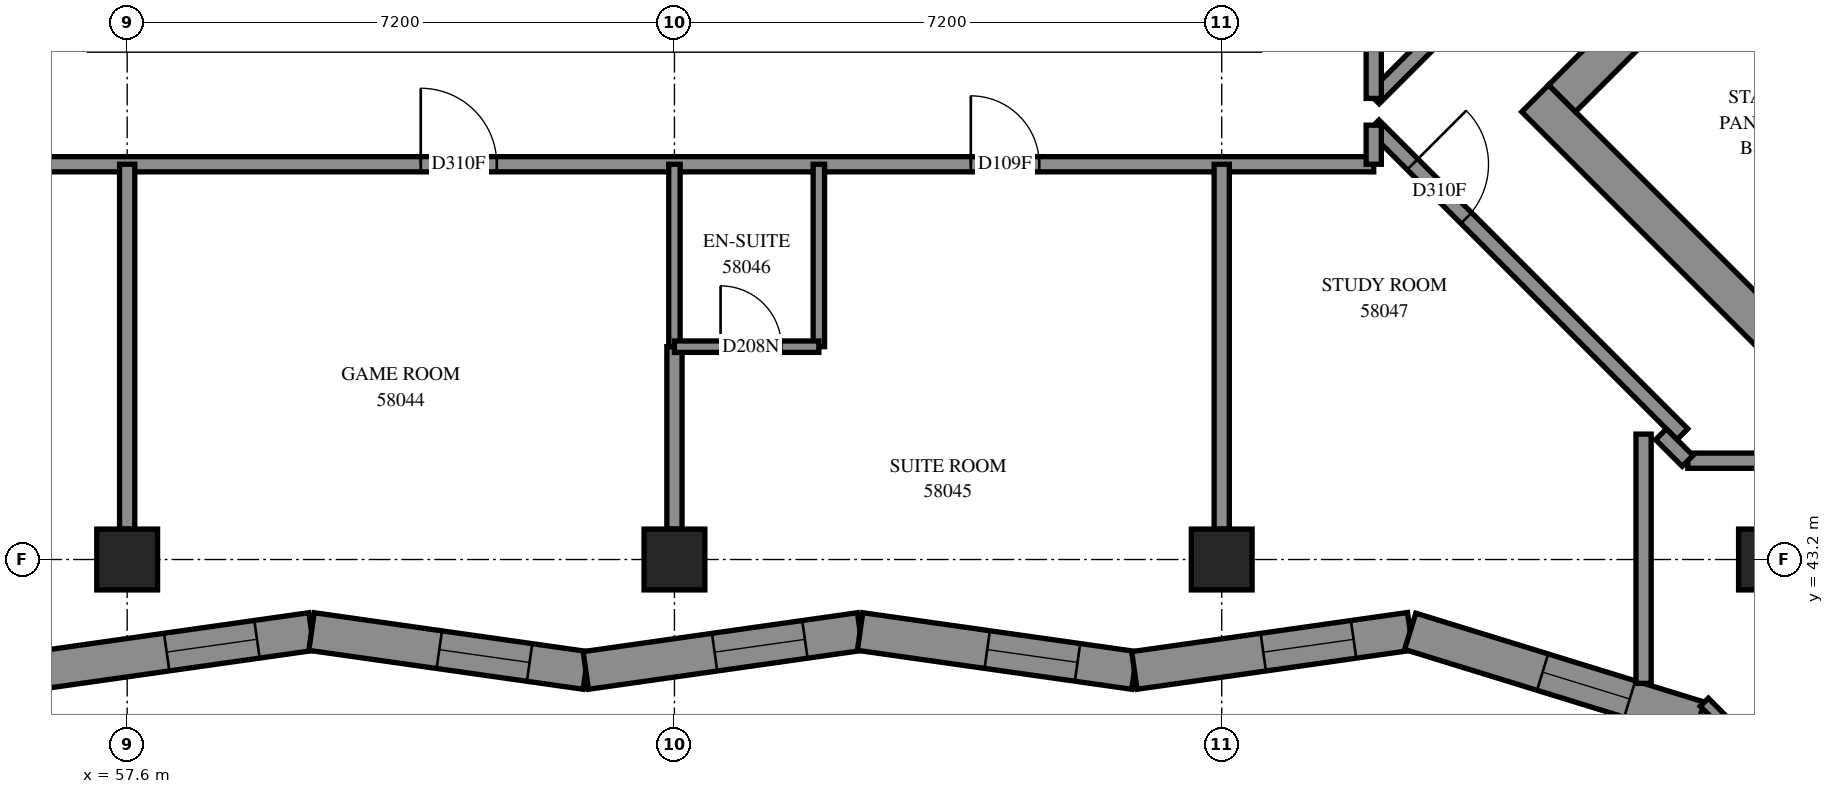
"""IFC4 building model, lengths in metres.
Left out: names, types, materials, properties, quantities, classifications, styles, units other than length and angle.
Written with IfcOpenShell. Run it as: python <this file> out.ifc"""

import sys

from ifc_helpers import new_model, si_unit, direction, frame, frame_2d, origin, origin_2d, place, context, subcontext, project, spatial, polyline, rectangle, outline, extrude, element, fill, save


model = new_model("IFC4")
c1 = context("Model", 3, precision=1e-05, world=origin(), true_north=direction((0.0, 1.0)))
c2 = subcontext(c1, "Body", "Model", "MODEL_VIEW")
j1 = project(units=[si_unit("LENGTHUNIT", "METRE"), si_unit("PLANEANGLEUNIT", "RADIAN")], contexts=[c1])
p1 = place(None, origin())
s1 = spatial("IfcSite", under=j1, at=p1, CompositionType="ELEMENT")
p2 = place(p1, origin())
s2 = spatial("IfcBuilding", under=s1, at=p2, CompositionType="ELEMENT")
p3 = place(p2, frame((0.0, 0.0, 213.4)))
s3 = spatial("IfcBuildingStorey", under=s2, at=p3, CompositionType="ELEMENT", Elevation=213.4)
for number, where, z_axis, x_axis in (
    (1, (57.6, 43.2, 0.0), (0.0, 0.0, 1.0), (1.0, 0.0, 0.0)),
    (2, (64.8, 43.2, 0.0), (0.0, 0.0, 1.0), (1.0, 0.0, 0.0)),
    (3, (72.0, 43.2, 0.0), (0.0, 0.0, 1.0), (1.0, 0.0, 0.0)),
    (4, (79.2, 43.2, 0.0), (0.0, 0.0, 1.0), (1.0, 0.0, 0.0)),
):
    element("IfcColumn", number, at=place(p3, frame(where, z_axis=z_axis, x_axis=x_axis)), inside=s3, PredefinedType="COLUMN", context=c2, shape_type="SweptSolid", body=[
        extrude(rectangle(XDim=0.8, YDim=0.8, at=origin_2d()), origin(), (0.0, 0.0, 1.0), 3.1),
    ])
p4 = place(p3, frame((76.124, 49.267, -0.3), z_axis=(0.0, 0.0, 1.0), x_axis=(0.7071067812, -0.7071067812, 0.0)))
e5 = element("IfcWall", 5, at=p4, inside=s3, PredefinedType="SHEAR", context=c2, shape_type="SweptSolid", body=[
    extrude(rectangle(XDim=15.4, YDim=0.5, at=frame_2d((7.7, 0.0))), origin(), (0.0, 0.0, 1.0), 2.7),
])
p5 = place(p3, frame((76.478, 49.267, -0.3), z_axis=(0.0, 0.0, 1.0), x_axis=(0.7071067812, 0.7071067812, 0.0)))
e6 = element("IfcWall", 6, at=p5, inside=s3, PredefinedType="SHEAR", context=c2, shape_type="SweptSolid", body=[
    extrude(rectangle(XDim=14.4, YDim=0.5, at=frame_2d((7.2, 0.0))), origin(), (0.0, 0.0, 1.0), 2.7),
])
p6 = place(p5, frame((4.55, 0.0, 0.3)))
e7 = element("IfcOpeningElement", 7, at=p6, cuts=e6, PredefinedType="OPENING", context=c2, shape_type="SweptSolid", body=[
    extrude(rectangle(XDim=1.1, YDim=2.1, at=frame_2d((0.55, 1.05))), frame((0.0, 0.26, 0.0), z_axis=(0.0, -1.0, 0.0), x_axis=(1.0, 0.0, 0.0)), (0.0, 0.0, 1.0), 0.52),
])
p7 = place(p5, frame((11.35, 0.0, 0.3)))
e8 = element("IfcOpeningElement", 8, at=p7, cuts=e6, PredefinedType="OPENING", context=c2, shape_type="SweptSolid", body=[
    extrude(rectangle(XDim=1.1, YDim=2.1, at=frame_2d((0.55, 1.05))), frame((0.0, 0.26, 0.0), z_axis=(0.0, -1.0, 0.0), x_axis=(1.0, 0.0, 0.0)), (0.0, 0.0, 1.0), 0.52),
])
p8 = place(p3, frame((78.988, 51.423, 0.0), z_axis=(0.0, 0.0, 1.0), x_axis=(0.7071067812, -0.7071067812, 0.0)))
e9 = element("IfcWall", 9, at=p8, inside=s3, PredefinedType="SOLIDWALL", context=c2, shape_type="SweptSolid", body=[
    extrude(rectangle(XDim=14.4, YDim=0.3, at=frame_2d((7.2, 0.0))), origin(), (0.0, 0.0, 1.0), 3.1),
])
p9 = place(p8, frame((1.35, 0.0, 0.0)))
e10 = element("IfcOpeningElement", 10, at=p9, cuts=e9, PredefinedType="OPENING", context=c2, shape_type="SweptSolid", body=[
    extrude(rectangle(XDim=0.9, YDim=2.1, at=frame_2d((0.45, 1.05))), frame((0.0, 0.16, 0.0), z_axis=(0.0, -1.0, 0.0), x_axis=(1.0, 0.0, 0.0)), (0.0, 0.0, 1.0), 0.32),
])
p10 = place(p8, frame((4.95, 0.0, 0.0)))
e11 = element("IfcOpeningElement", 11, at=p10, cuts=e9, PredefinedType="OPENING", context=c2, shape_type="SweptSolid", body=[
    extrude(rectangle(XDim=0.9, YDim=2.1, at=frame_2d((0.45, 1.05))), frame((0.0, 0.16, 0.0), z_axis=(0.0, -1.0, 0.0), x_axis=(1.0, 0.0, 0.0)), (0.0, 0.0, 1.0), 0.32),
])
p11 = place(p8, frame((8.55, 0.0, 0.0)))
e12 = element("IfcOpeningElement", 12, at=p11, cuts=e9, PredefinedType="OPENING", context=c2, shape_type="SweptSolid", body=[
    extrude(rectangle(XDim=0.9, YDim=2.1, at=frame_2d((0.45, 1.05))), frame((0.0, 0.16, 0.0), z_axis=(0.0, -1.0, 0.0), x_axis=(1.0, 0.0, 0.0)), (0.0, 0.0, 1.0), 0.32),
])
p12 = place(p8, frame((12.05, 0.0, 0.0)))
e13 = element("IfcOpeningElement", 13, at=p12, cuts=e9, PredefinedType="OPENING", context=c2, shape_type="SweptSolid", body=[
    extrude(rectangle(XDim=1.1, YDim=2.1, at=frame_2d((0.55, 1.05))), frame((0.0, 0.16, 0.0), z_axis=(0.0, -1.0, 0.0), x_axis=(1.0, 0.0, 0.0)), (0.0, 0.0, 1.0), 0.32),
])
p13 = place(p3, frame((56.417, 41.74, 0.0), z_axis=(0.0, 0.0, 1.0), x_axis=(0.9900834903, 0.1404801848, 0.0)))
e14 = element("IfcWall", 14, at=p13, inside=s3, PredefinedType="SOLIDWALL", context=c2, shape_type="SweptSolid", body=[
    extrude(outline(polyline([(-0.035, -0.25), (3.609, -0.25), (3.68, 0.25), (0.035, 0.25), (-0.035, -0.25)])), origin(), (0.0, 0.0, 1.0), 3.1),
])
p14 = place(p13, frame((1.72, 0.0, 0.45)))
e15 = element("IfcOpeningElement", 15, at=p14, cuts=e14, PredefinedType="OPENING", context=c2, shape_type="SweptSolid", body=[
    extrude(rectangle(XDim=1.2, YDim=2.5, at=frame_2d((0.6, 1.25))), frame((0.0, 0.26, 0.0), z_axis=(0.0, -1.0, 0.0), x_axis=(1.0, 0.0, 0.0)), (0.0, 0.0, 1.0), 0.52),
])
p15 = place(p3, frame((60.026, 42.252, 0.0), z_axis=(0.0, 0.0, 1.0), x_axis=(0.9900829488, -0.1404840012, 0.0)))
e16 = element("IfcWall", 16, at=p15, inside=s3, PredefinedType="SOLIDWALL", context=c2, shape_type="SweptSolid", body=[
    extrude(outline(polyline([(0.035, -0.25), (3.68, -0.25), (3.609, 0.25), (-0.035, 0.25), (0.035, -0.25)])), origin(), (0.0, 0.0, 1.0), 3.1),
])
p16 = place(p15, frame((1.698, 0.0, 0.45)))
e17 = element("IfcOpeningElement", 17, at=p16, cuts=e16, PredefinedType="OPENING", context=c2, shape_type="SweptSolid", body=[
    extrude(rectangle(XDim=1.2, YDim=2.5, at=frame_2d((0.6, 1.25))), frame((0.0, 0.26, 0.0), z_axis=(0.0, -1.0, 0.0), x_axis=(1.0, 0.0, 0.0)), (0.0, 0.0, 1.0), 0.52),
])
p17 = place(p3, frame((63.634, 41.74, 0.0), z_axis=(0.0, 0.0, 1.0), x_axis=(0.9900834903, 0.1404801848, 0.0)))
e18 = element("IfcWall", 18, at=p17, inside=s3, PredefinedType="SOLIDWALL", context=c2, shape_type="SweptSolid", body=[
    extrude(outline(polyline([(-0.035, -0.25), (3.609, -0.25), (3.68, 0.25), (0.035, 0.25), (-0.035, -0.25)])), origin(), (0.0, 0.0, 1.0), 3.1),
])
p18 = place(p17, frame((1.711, 0.0, 0.45)))
e19 = element("IfcOpeningElement", 19, at=p18, cuts=e18, PredefinedType="OPENING", context=c2, shape_type="SweptSolid", body=[
    extrude(rectangle(XDim=1.2, YDim=2.5, at=frame_2d((0.6, 1.25))), frame((0.0, 0.26, 0.0), z_axis=(0.0, -1.0, 0.0), x_axis=(1.0, 0.0, 0.0)), (0.0, 0.0, 1.0), 0.52),
])
p19 = place(p3, frame((67.242, 42.252, 0.0), z_axis=(0.0, 0.0, 1.0), x_axis=(0.9900834903, -0.1404801848, 0.0)))
e20 = element("IfcWall", 20, at=p19, inside=s3, PredefinedType="SOLIDWALL", context=c2, shape_type="SweptSolid", body=[
    extrude(outline(polyline([(0.035, -0.25), (3.68, -0.25), (3.609, 0.25), (-0.035, 0.25), (0.035, -0.25)])), origin(), (0.0, 0.0, 1.0), 3.1),
])
p20 = place(p19, frame((1.689, 0.0, 0.45)))
e21 = element("IfcOpeningElement", 21, at=p20, cuts=e20, PredefinedType="OPENING", context=c2, shape_type="SweptSolid", body=[
    extrude(rectangle(XDim=1.2, YDim=2.5, at=frame_2d((0.6, 1.25))), frame((0.0, 0.26, 0.0), z_axis=(0.0, -1.0, 0.0), x_axis=(1.0, 0.0, 0.0)), (0.0, 0.0, 1.0), 0.52),
])
p21 = place(p3, frame((70.851, 41.74, 0.0), z_axis=(0.0, 0.0, 1.0), x_axis=(0.9900822045, 0.140489246, 0.0)))
e22 = element("IfcWall", 22, at=p21, inside=s3, PredefinedType="SOLIDWALL", context=c2, shape_type="SweptSolid", body=[
    extrude(outline(polyline([(-0.035, -0.25), (3.609, -0.25), (3.721, 0.25), (0.035, 0.25), (-0.035, -0.25)])), origin(), (0.0, 0.0, 1.0), 3.1),
])
p22 = place(p21, frame((1.713, 0.0, 0.45)))
e23 = element("IfcOpeningElement", 23, at=p22, cuts=e22, PredefinedType="OPENING", context=c2, shape_type="SweptSolid", body=[
    extrude(rectangle(XDim=1.2, YDim=2.5, at=frame_2d((0.6, 1.25))), frame((0.0, 0.26, 0.0), z_axis=(0.0, -1.0, 0.0), x_axis=(1.0, 0.0, 0.0)), (0.0, 0.0, 1.0), 0.52),
])
p23 = place(p3, frame((74.48, 42.255, 0.0), z_axis=(0.0, 0.0, 1.0), x_axis=(0.9556504763, -0.2945032548, 0.0)))
e24 = element("IfcWall", 24, at=p23, inside=s3, PredefinedType="SOLIDWALL", context=c2, shape_type="SweptSolid", body=[
    extrude(outline(polyline([(0.056, -0.25), (3.832, -0.25), (4.114, 0.25), (-0.056, 0.25), (0.056, -0.25)])), origin(), (0.0, 0.0, 1.0), 3.1),
])
p24 = place(p23, frame((1.823, 0.0, 0.45)))
e25 = element("IfcOpeningElement", 25, at=p24, cuts=e24, PredefinedType="OPENING", context=c2, shape_type="SweptSolid", body=[
    extrude(rectangle(XDim=1.2, YDim=2.5, at=frame_2d((0.6, 1.25))), frame((0.0, 0.26, 0.0), z_axis=(0.0, -1.0, 0.0), x_axis=(1.0, 0.0, 0.0)), (0.0, 0.0, 1.0), 0.52),
])
p25 = place(p3, frame((78.276, 41.085, 0.0), z_axis=(0.0, 0.0, 1.0), x_axis=(0.2425659058, -0.9701349295, 0.0)))
e26 = element("IfcWall", 26, at=p25, inside=s3, PredefinedType="SOLIDWALL", context=c2, shape_type="SweptSolid", body=[
    extrude(outline(polyline([(0.141, -0.25), (4.806, -0.25), (4.519, 0.25), (-0.141, 0.25), (0.141, -0.25)])), origin(), (0.0, 0.0, 1.0), 3.1),
])
p26 = place(p25, frame((1.875, 0.0, 0.45)))
e27 = element("IfcOpeningElement", 27, at=p26, cuts=e26, PredefinedType="OPENING", context=c2, shape_type="SweptSolid", body=[
    extrude(rectangle(XDim=1.2, YDim=2.5, at=frame_2d((0.6, 1.25))), frame((0.0, 0.26, 0.0), z_axis=(0.0, -1.0, 0.0), x_axis=(1.0, 0.0, 0.0)), (0.0, 0.0, 1.0), 0.52),
])
p27 = place(p3, frame((55.6, 48.4, 0.0), z_axis=(0.0, 0.0, 1.0), x_axis=(1.0, 0.0, 0.0)))
e28 = element("IfcWall", 28, at=p27, inside=s3, PredefinedType="PARTITIONING", context=c2, shape_type="SweptSolid", body=[
    extrude(rectangle(XDim=18.4, YDim=0.2, at=frame_2d((9.2, 0.0))), origin(), (0.0, 0.0, 1.0), 3.1),
])
p28 = place(p27, frame((5.862, 0.0, 0.0)))
e29 = element("IfcOpeningElement", 29, at=p28, cuts=e28, PredefinedType="OPENING", context=c2, shape_type="SweptSolid", body=[
    extrude(rectangle(XDim=1.0, YDim=2.1, at=frame_2d((0.5, 1.05))), frame((0.0, 0.11, 0.0), z_axis=(0.0, -1.0, 0.0), x_axis=(1.0, 0.0, 0.0)), (0.0, 0.0, 1.0), 0.22),
])
p29 = place(p27, frame((13.099, 0.0, 0.0)))
e30 = element("IfcOpeningElement", 30, at=p29, cuts=e28, PredefinedType="OPENING", context=c2, shape_type="SweptSolid", body=[
    extrude(rectangle(XDim=0.9, YDim=2.1, at=frame_2d((0.45, 1.05))), frame((0.0, 0.11, 0.0), z_axis=(0.0, -1.0, 0.0), x_axis=(1.0, 0.0, 0.0)), (0.0, 0.0, 1.0), 0.22),
])
p30 = place(p3, frame((73.999, 48.911, 0.0), z_axis=(0.0, 0.0, 1.0), x_axis=(0.7071067812, -0.7071067812, 0.0)))
e31 = element("IfcWall", 31, at=p30, inside=s3, PredefinedType="PARTITIONING", context=c2, shape_type="SweptSolid", body=[
    extrude(rectangle(XDim=5.745, YDim=0.2, at=frame_2d((2.872, 0.0))), origin(), (0.0, 0.0, 1.0), 3.1),
])
p31 = place(p30, frame((0.724, 0.0, 0.0)))
e32 = element("IfcOpeningElement", 32, at=p31, cuts=e31, PredefinedType="OPENING", context=c2, shape_type="SweptSolid", body=[
    extrude(rectangle(XDim=1.0, YDim=2.1, at=frame_2d((0.5, 1.05))), frame((0.0, 0.11, 0.0), z_axis=(0.0, -1.0, 0.0), x_axis=(1.0, 0.0, 0.0)), (0.0, 0.0, 1.0), 0.22),
])
p32 = place(p3, frame((74.001, 49.267, 0.0), z_axis=(0.0, 0.0, 1.0), x_axis=(0.7071067812, 0.7071067812, 0.0)))
e33 = element("IfcWall", 33, at=p32, inside=s3, PredefinedType="PARTITIONING", context=c2, shape_type="SweptSolid", body=[
    extrude(rectangle(XDim=5.278, YDim=0.2, at=frame_2d((2.639, 0.0))), origin(), (0.0, 0.0, 1.0), 3.1),
])
for number, where, z_axis, x_axis in (
    (34, (57.6, 43.6, 0.0), (0.0, 0.0, 1.0), (0.0, 1.0, 0.0)),
    (35, (72.0, 43.6, 0.0), (0.0, 0.0, 1.0), (0.0, 1.0, 0.0)),
):
    element("IfcWall", number, at=place(p3, frame(where, z_axis=z_axis, x_axis=x_axis)), inside=s3, PredefinedType="PARTITIONING", context=c2, shape_type="SweptSolid", body=[
        extrude(rectangle(XDim=4.8, YDim=0.2, at=frame_2d((2.4, 0.0))), origin(), (0.0, 0.0, 1.0), 3.1),
    ])
p33 = place(p3, frame((74.0, 49.266, 0.0), z_axis=(0.0, 0.0, 1.0), x_axis=(0.0, 1.0, 0.0)))
e36 = element("IfcWall", 36, at=p33, inside=s3, PredefinedType="PARTITIONING", context=c2, shape_type="SweptSolid", body=[
    extrude(rectangle(XDim=3.734, YDim=0.2, at=frame_2d((1.867, 0.0))), origin(), (0.0, 0.0, 1.0), 3.1),
])
p34 = place(p3, frame((77.55, 41.571, 0.0), z_axis=(0.0, 0.0, 1.0), x_axis=(0.0, 1.0, 0.0)))
e37 = element("IfcWall", 37, at=p34, inside=s3, PredefinedType="PARTITIONING", context=c2, shape_type="SweptSolid", body=[
    extrude(rectangle(XDim=3.279, YDim=0.2, at=frame_2d((1.64, 0.0))), origin(), (0.0, 0.0, 1.0), 3.1),
])
p35 = place(p3, frame((78.349, 41.322, 0.0), z_axis=(0.0, 0.0, 1.0), x_axis=(0.7065914398, -0.7076217472, 0.0)))
e38 = element("IfcWall", 38, at=p35, inside=s3, PredefinedType="PARTITIONING", context=c2, shape_type="SweptSolid", body=[
    extrude(rectangle(XDim=3.009, YDim=0.15, at=frame_2d((1.504, 0.0))), origin(), (0.0, 0.0, 1.0), 3.1),
])
p36 = place(p3, frame((64.8, 43.6, 0.0), z_axis=(0.0, 0.0, 1.0), x_axis=(0.0, 1.0, 0.0)))
e39 = element("IfcWall", 39, at=p36, inside=s3, PredefinedType="PARTITIONING", context=c2, shape_type="SweptSolid", body=[
    extrude(rectangle(XDim=2.4, YDim=0.2, at=frame_2d((1.2, 0.0))), origin(), (0.0, 0.0, 1.0), 3.1),
])
for number, where, z_axis, x_axis in (
    (40, (66.7, 46.0, 0.0), (0.0, 0.0, 1.0), (0.0, 1.0, 0.0)),
    (41, (64.8, 46.0, 0.0), (0.0, 0.0, 1.0), (0.0, 1.0, 0.0)),
):
    element("IfcWall", number, at=place(p3, frame(where, z_axis=z_axis, x_axis=x_axis)), inside=s3, PredefinedType="PARTITIONING", context=c2, shape_type="SweptSolid", body=[
        extrude(rectangle(XDim=2.4, YDim=0.15, at=frame_2d((1.2, 0.0))), origin(), (0.0, 0.0, 1.0), 3.1),
    ])
p37 = place(p3, frame((78.132, 44.5, 0.0), z_axis=(0.0, 0.0, 1.0), x_axis=(1.0, 0.0, 0.0)))
e42 = element("IfcWall", 42, at=p37, inside=s3, PredefinedType="PARTITIONING", context=c2, shape_type="SweptSolid", body=[
    extrude(rectangle(XDim=2.292, YDim=0.2, at=frame_2d((1.146, 0.0))), origin(), (0.0, 0.0, 1.0), 3.1),
])
p38 = place(p3, frame((78.763, 40.169, 0.0), z_axis=(0.0, 0.0, 1.0), x_axis=(0.7070811971, 0.7071323644, 0.0)))
e43 = element("IfcWall", 43, at=p38, inside=s3, PredefinedType="PARTITIONING", context=c2, shape_type="SweptSolid", body=[
    extrude(rectangle(XDim=1.954, YDim=0.15, at=frame_2d((0.977, 0.0))), origin(), (0.0, 0.0, 1.0), 3.1),
])
p39 = place(p3, frame((64.8, 46.0, 0.0), z_axis=(0.0, 0.0, 1.0), x_axis=(1.0, 0.0, 0.0)))
e44 = element("IfcWall", 44, at=p39, inside=s3, PredefinedType="PARTITIONING", context=c2, shape_type="SweptSolid", body=[
    extrude(rectangle(XDim=1.9, YDim=0.15, at=frame_2d((0.95, 0.0))), origin(), (0.0, 0.0, 1.0), 3.1),
])
p40 = place(p39, frame((0.607, 0.0, 0.0)))
e45 = element("IfcOpeningElement", 45, at=p40, cuts=e44, PredefinedType="OPENING", context=c2, shape_type="SweptSolid", body=[
    extrude(rectangle(XDim=0.8, YDim=2.1, at=frame_2d((0.4, 1.05))), frame((0.0, 0.085, 0.0), z_axis=(0.0, -1.0, 0.0), x_axis=(1.0, 0.0, 0.0)), (0.0, 0.0, 1.0), 0.17),
])
p41 = place(p3, frame((74.0, 48.4, 0.0), z_axis=(0.0, 0.0, 1.0), x_axis=(0.0, 1.0, 0.0)))
e46 = element("IfcWall", 46, at=p41, inside=s3, PredefinedType="PARTITIONING", context=c2, shape_type="SweptSolid", body=[
    extrude(rectangle(XDim=0.514, YDim=0.2, at=frame_2d((0.257, 0.0))), origin(), (0.0, 0.0, 1.0), 3.1),
])
p42 = place(p3, frame((77.779, 44.847, 0.0), z_axis=(0.0, 0.0, 1.0), x_axis=(0.7071067812, -0.7071067812, 0.0)))
e47 = element("IfcWall", 47, at=p42, inside=s3, PredefinedType="PARTITIONING", context=c2, shape_type="SweptSolid", body=[
    extrude(rectangle(XDim=0.495, YDim=0.2, at=frame_2d((0.247, 0.0))), origin(), (0.0, 0.0, 1.0), 3.1),
])
p43 = place(p14, origin())
e48 = element("IfcWindow", 48, at=p43, inside=s3, PartitioningType="SINGLE_PANEL", PredefinedType="WINDOW", context=c2, shape_type="SweptSolid", body=[
    extrude(rectangle(XDim=1.2, YDim=2.5, at=frame_2d((0.6, 1.25))), frame((0.0, 0.18, 0.0), z_axis=(0.0, -1.0, 0.0), x_axis=(1.0, 0.0, 0.0)), (0.0, 0.0, 1.0), 0.06),
])
fill(e15, e48)
p44 = place(p16, origin())
e49 = element("IfcWindow", 49, at=p44, inside=s3, PartitioningType="SINGLE_PANEL", PredefinedType="WINDOW", context=c2, shape_type="SweptSolid", body=[
    extrude(rectangle(XDim=1.2, YDim=2.5, at=frame_2d((0.6, 1.25))), frame((0.0, 0.18, 0.0), z_axis=(0.0, -1.0, 0.0), x_axis=(1.0, 0.0, 0.0)), (0.0, 0.0, 1.0), 0.06),
])
fill(e17, e49)
p45 = place(p18, origin())
e50 = element("IfcWindow", 50, at=p45, inside=s3, PartitioningType="SINGLE_PANEL", PredefinedType="WINDOW", context=c2, shape_type="SweptSolid", body=[
    extrude(rectangle(XDim=1.2, YDim=2.5, at=frame_2d((0.6, 1.25))), frame((0.0, 0.18, 0.0), z_axis=(0.0, -1.0, 0.0), x_axis=(1.0, 0.0, 0.0)), (0.0, 0.0, 1.0), 0.06),
])
fill(e19, e50)
p46 = place(p20, origin())
e51 = element("IfcWindow", 51, at=p46, inside=s3, PartitioningType="SINGLE_PANEL", PredefinedType="WINDOW", context=c2, shape_type="SweptSolid", body=[
    extrude(rectangle(XDim=1.2, YDim=2.5, at=frame_2d((0.6, 1.25))), frame((0.0, 0.18, 0.0), z_axis=(0.0, -1.0, 0.0), x_axis=(1.0, 0.0, 0.0)), (0.0, 0.0, 1.0), 0.06),
])
fill(e21, e51)
p47 = place(p22, origin())
e52 = element("IfcWindow", 52, at=p47, inside=s3, PartitioningType="SINGLE_PANEL", PredefinedType="WINDOW", context=c2, shape_type="SweptSolid", body=[
    extrude(rectangle(XDim=1.2, YDim=2.5, at=frame_2d((0.6, 1.25))), frame((0.0, 0.18, 0.0), z_axis=(0.0, -1.0, 0.0), x_axis=(1.0, 0.0, 0.0)), (0.0, 0.0, 1.0), 0.06),
])
fill(e23, e52)
p48 = place(p24, origin())
e53 = element("IfcWindow", 53, at=p48, inside=s3, PartitioningType="SINGLE_PANEL", PredefinedType="WINDOW", context=c2, shape_type="SweptSolid", body=[
    extrude(rectangle(XDim=1.2, YDim=2.5, at=frame_2d((0.6, 1.25))), frame((0.0, 0.18, 0.0), z_axis=(0.0, -1.0, 0.0), x_axis=(1.0, 0.0, 0.0)), (0.0, 0.0, 1.0), 0.06),
])
fill(e25, e53)
p49 = place(p28, origin())
e54 = element("IfcDoor", 54, at=p49, inside=s3, OperationType="SINGLE_SWING_LEFT", PredefinedType="DOOR", context=c2, shape_type="SweptSolid", body=[
    extrude(rectangle(XDim=1.0, YDim=2.1, at=frame_2d((0.5, 1.05))), frame((0.0, 0.025, 0.0), z_axis=(0.0, -1.0, 0.0), x_axis=(1.0, 0.0, 0.0)), (0.0, 0.0, 1.0), 0.05),
])
fill(e29, e54)
p50 = place(p29, origin())
e55 = element("IfcDoor", 55, at=p50, inside=s3, OperationType="SINGLE_SWING_LEFT", PredefinedType="DOOR", context=c2, shape_type="SweptSolid", body=[
    extrude(rectangle(XDim=0.9, YDim=2.1, at=frame_2d((0.45, 1.05))), frame((0.0, 0.025, 0.0), z_axis=(0.0, -1.0, 0.0), x_axis=(1.0, 0.0, 0.0)), (0.0, 0.0, 1.0), 0.05),
])
fill(e30, e55)
p51 = place(p40, origin())
e56 = element("IfcDoor", 56, at=p51, inside=s3, OperationType="SINGLE_SWING_RIGHT", PredefinedType="DOOR", context=c2, shape_type="SweptSolid", body=[
    extrude(rectangle(XDim=0.8, YDim=2.1, at=frame_2d((0.4, 1.05))), frame((0.0, 0.025, 0.0), z_axis=(0.0, -1.0, 0.0), x_axis=(1.0, 0.0, 0.0)), (0.0, 0.0, 1.0), 0.05),
])
fill(e45, e56)
p52 = place(p31, origin())
e57 = element("IfcDoor", 57, at=p52, inside=s3, OperationType="SINGLE_SWING_LEFT", PredefinedType="DOOR", context=c2, shape_type="SweptSolid", body=[
    extrude(rectangle(XDim=1.0, YDim=2.1, at=frame_2d((0.5, 1.05))), frame((0.0, 0.025, 0.0), z_axis=(0.0, -1.0, 0.0), x_axis=(1.0, 0.0, 0.0)), (0.0, 0.0, 1.0), 0.05),
])
fill(e32, e57)
save(model, sys.argv[1])
